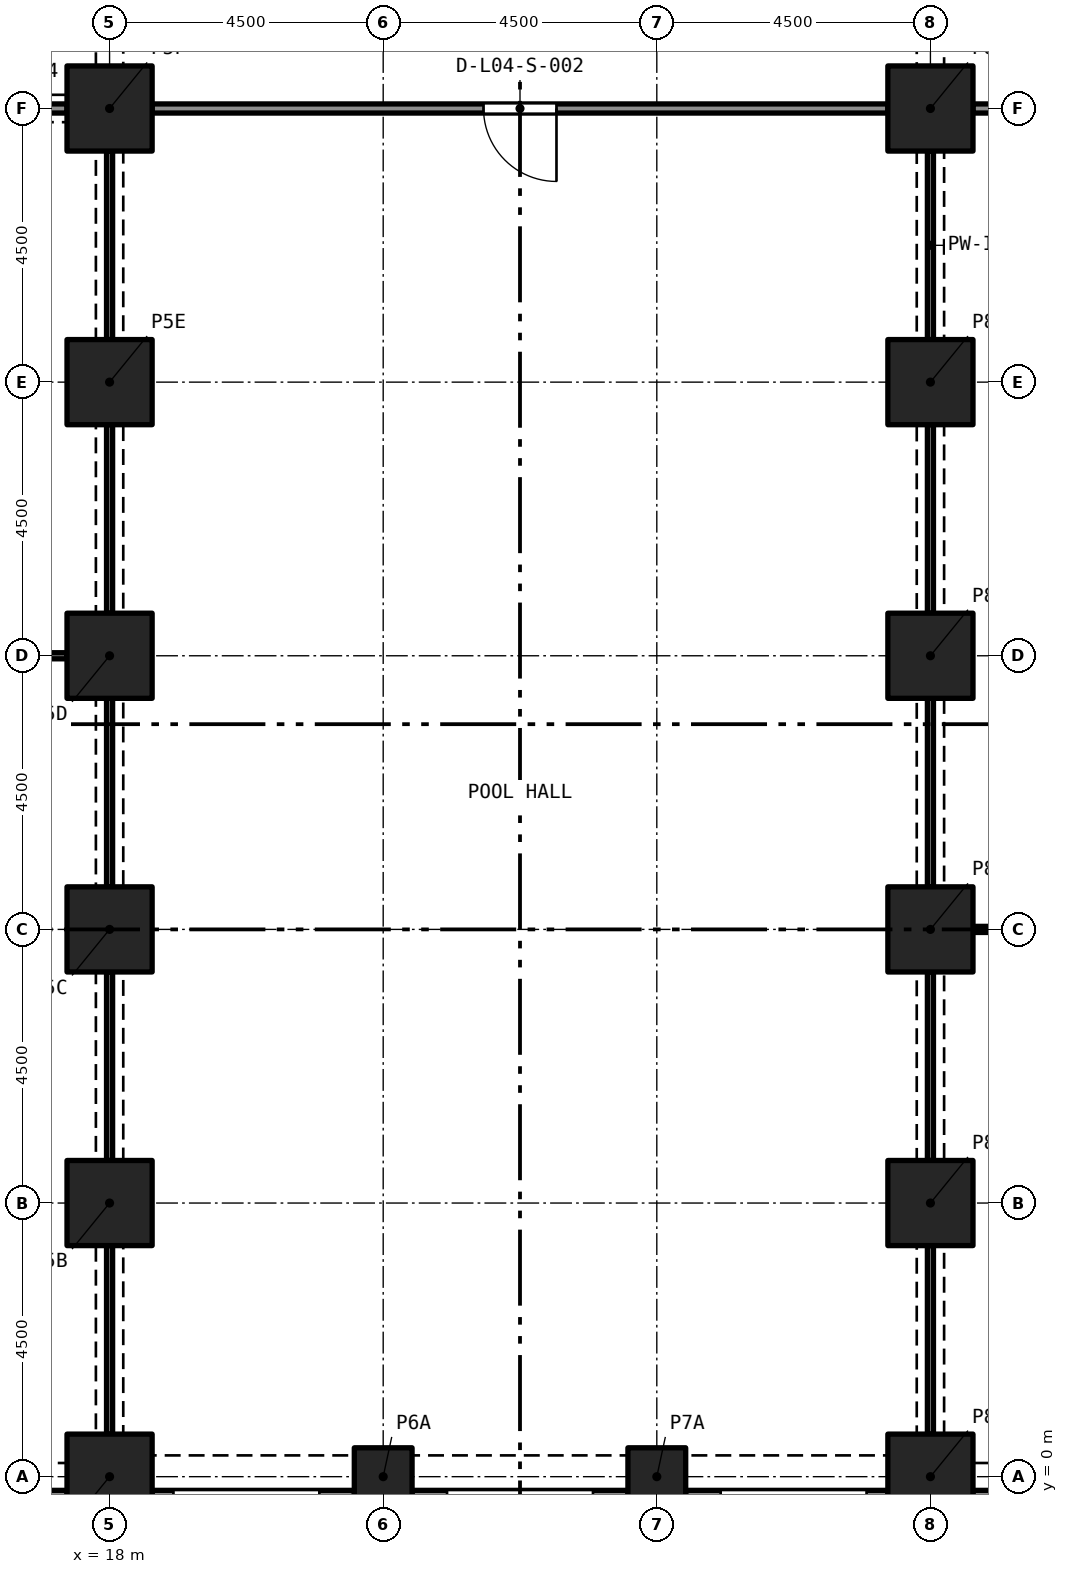
"""IFC4 building model, lengths in metres.
Left out: names, types, materials, properties, quantities, classifications, styles, units other than length and angle.
Written with IfcOpenShell. Run it as: python <this file> out.ifc"""

import sys

from ifc_helpers import new_model, si_unit, direction, frame, frame_2d, origin, origin_2d, place, context, subcontext, project, spatial, rectangle, extrude, element, fill, save


model = new_model("IFC4")
c1 = context("Model", 3, precision=1e-05, world=origin(), true_north=direction((0.0, 1.0)))
c2 = subcontext(c1, "Body", "Model", "MODEL_VIEW")
j1 = project(units=[si_unit("LENGTHUNIT", "METRE"), si_unit("PLANEANGLEUNIT", "RADIAN")], contexts=[c1])
p1 = place(None, origin())
s1 = spatial("IfcSite", under=j1, at=p1, CompositionType="ELEMENT")
p2 = place(p1, origin())
s2 = spatial("IfcBuilding", under=s1, at=p2, CompositionType="ELEMENT")
p3 = place(p2, frame((0.0, 0.0, 21.0)))
s3 = spatial("IfcBuildingStorey", under=s2, at=p3, CompositionType="ELEMENT", Elevation=21.0)
p4 = place(p3, frame((18.0, 0.0, 0.0), z_axis=(0.0, 0.0, 1.0), x_axis=(1.0, 0.0, 0.0)))
e1 = element("IfcColumn", 1, at=p4, inside=s3, PredefinedType="COLUMN", context=c2, shape_type="SweptSolid", body=[
    extrude(rectangle(XDim=1.4, YDim=1.4, at=origin_2d()), origin(), (0.0, 0.0, 1.0), 5.0),
])
for number, where, z_axis, x_axis in (
    (2, (22.5, 0.0, 0.0), (0.0, 0.0, 1.0), (1.0, 0.0, 0.0)),
    (3, (27.0, 0.0, 0.0), (0.0, 0.0, 1.0), (1.0, 0.0, 0.0)),
):
    element("IfcColumn", number, at=place(p3, frame(where, z_axis=z_axis, x_axis=x_axis)), inside=s3, PredefinedType="COLUMN", context=c2, shape_type="SweptSolid", body=[
        extrude(rectangle(XDim=0.95, YDim=0.95, at=origin_2d()), origin(), (0.0, 0.0, 1.0), 5.0),
    ])
for number, where, z_axis, x_axis in (
    (4, (31.5, 0.0, 0.0), (0.0, 0.0, 1.0), (1.0, 0.0, 0.0)),
    (5, (18.0, 4.5, 0.0), (0.0, 0.0, 1.0), (1.0, 0.0, 0.0)),
    (6, (31.5, 4.5, 0.0), (0.0, 0.0, 1.0), (1.0, 0.0, 0.0)),
    (7, (18.0, 9.0, 0.0), (0.0, 0.0, 1.0), (1.0, 0.0, 0.0)),
    (8, (31.5, 9.0, 0.0), (0.0, 0.0, 1.0), (1.0, 0.0, 0.0)),
    (9, (18.0, 13.5, 0.0), (0.0, 0.0, 1.0), (1.0, 0.0, 0.0)),
    (10, (31.5, 13.5, 0.0), (0.0, 0.0, 1.0), (1.0, 0.0, 0.0)),
    (11, (18.0, 18.0, 0.0), (0.0, 0.0, 1.0), (1.0, 0.0, 0.0)),
    (12, (31.5, 18.0, 0.0), (0.0, 0.0, 1.0), (1.0, 0.0, 0.0)),
    (13, (18.0, 22.5, 0.0), (0.0, 0.0, 1.0), (1.0, 0.0, 0.0)),
    (14, (31.5, 22.5, 0.0), (0.0, 0.0, 1.0), (1.0, 0.0, 0.0)),
):
    element("IfcColumn", number, at=place(p3, frame(where, z_axis=z_axis, x_axis=x_axis)), inside=s3, PredefinedType="COLUMN", context=c2, shape_type="SweptSolid", body=[
        extrude(rectangle(XDim=1.4, YDim=1.4, at=origin_2d()), origin(), (0.0, 0.0, 1.0), 5.0),
    ])
p5 = place(p3, frame((17.3, -0.375, 0.0), z_axis=(0.0, 0.0, 1.0), x_axis=(-1.0, 0.0, 0.0)))
e15 = element("IfcWall", 15, at=p5, inside=s3, PredefinedType="SOLIDWALL", context=c2, shape_type="SweptSolid", body=[
    extrude(rectangle(XDim=3.1, YDim=0.3, at=frame_2d((1.55, 0.0))), origin(), (0.0, 0.0, 1.0), 5.0),
])
p6 = place(p5, frame((0.4, 0.0, 0.45)))
e16 = element("IfcOpeningElement", 16, at=p6, cuts=e15, PredefinedType="OPENING", context=c2, shape_type="SweptSolid", body=[
    extrude(rectangle(XDim=2.3, YDim=3.3, at=frame_2d((1.15, 1.65))), frame((0.0, 0.16, 0.0), z_axis=(0.0, -1.0, 0.0), x_axis=(1.0, 0.0, 0.0)), (0.0, 0.0, 1.0), 0.32),
])
p7 = place(p3, frame((22.025, -0.375, 0.0), z_axis=(0.0, 0.0, 1.0), x_axis=(-1.0, 0.0, 0.0)))
e17 = element("IfcWall", 17, at=p7, inside=s3, PredefinedType="SOLIDWALL", context=c2, shape_type="SweptSolid", body=[
    extrude(rectangle(XDim=3.325, YDim=0.3, at=frame_2d((1.663, 0.0))), origin(), (0.0, 0.0, 1.0), 5.0),
])
p8 = place(p7, frame((0.575, 0.0, 0.45)))
e18 = element("IfcOpeningElement", 18, at=p8, cuts=e17, PredefinedType="OPENING", context=c2, shape_type="SweptSolid", body=[
    extrude(rectangle(XDim=2.4, YDim=3.3, at=frame_2d((1.2, 1.65))), frame((0.0, 0.16, 0.0), z_axis=(0.0, -1.0, 0.0), x_axis=(1.0, 0.0, 0.0)), (0.0, 0.0, 1.0), 0.32),
])
p9 = place(p3, frame((26.525, -0.375, 0.0), z_axis=(0.0, 0.0, 1.0), x_axis=(-1.0, 0.0, 0.0)))
e19 = element("IfcWall", 19, at=p9, inside=s3, PredefinedType="SOLIDWALL", context=c2, shape_type="SweptSolid", body=[
    extrude(rectangle(XDim=3.55, YDim=0.3, at=frame_2d((1.775, 0.0))), origin(), (0.0, 0.0, 1.0), 5.0),
])
p10 = place(p9, frame((0.575, 0.0, 0.45)))
e20 = element("IfcOpeningElement", 20, at=p10, cuts=e19, PredefinedType="OPENING", context=c2, shape_type="SweptSolid", body=[
    extrude(rectangle(XDim=2.4, YDim=3.3, at=frame_2d((1.2, 1.65))), frame((0.0, 0.16, 0.0), z_axis=(0.0, -1.0, 0.0), x_axis=(1.0, 0.0, 0.0)), (0.0, 0.0, 1.0), 0.32),
])
p11 = place(p3, frame((30.8, -0.375, 0.0), z_axis=(0.0, 0.0, 1.0), x_axis=(-1.0, 0.0, 0.0)))
e21 = element("IfcWall", 21, at=p11, inside=s3, PredefinedType="SOLIDWALL", context=c2, shape_type="SweptSolid", body=[
    extrude(rectangle(XDim=3.325, YDim=0.3, at=frame_2d((1.663, 0.0))), origin(), (0.0, 0.0, 1.0), 5.0),
])
p12 = place(p11, frame((0.35, 0.0, 0.45)))
e22 = element("IfcOpeningElement", 22, at=p12, cuts=e21, PredefinedType="OPENING", context=c2, shape_type="SweptSolid", body=[
    extrude(rectangle(XDim=2.4, YDim=3.3, at=frame_2d((1.2, 1.65))), frame((0.0, 0.16, 0.0), z_axis=(0.0, -1.0, 0.0), x_axis=(1.0, 0.0, 0.0)), (0.0, 0.0, 1.0), 0.32),
])
p13 = place(p3, frame((35.3, -0.375, 0.0), z_axis=(0.0, 0.0, 1.0), x_axis=(-1.0, 0.0, 0.0)))
e23 = element("IfcWall", 23, at=p13, inside=s3, PredefinedType="SOLIDWALL", context=c2, shape_type="SweptSolid", body=[
    extrude(rectangle(XDim=3.1, YDim=0.3, at=frame_2d((1.55, 0.0))), origin(), (0.0, 0.0, 1.0), 5.0),
])
p14 = place(p13, frame((0.4, 0.0, 0.45)))
e24 = element("IfcOpeningElement", 24, at=p14, cuts=e23, PredefinedType="OPENING", context=c2, shape_type="SweptSolid", body=[
    extrude(rectangle(XDim=2.3, YDim=3.3, at=frame_2d((1.15, 1.65))), frame((0.0, 0.16, 0.0), z_axis=(0.0, -1.0, 0.0), x_axis=(1.0, 0.0, 0.0)), (0.0, 0.0, 1.0), 0.32),
])
p15 = place(p3, frame((30.8, 22.5, 0.0), z_axis=(0.0, 0.0, 1.0), x_axis=(-1.0, 0.0, 0.0)))
e25 = element("IfcWall", 25, at=p15, inside=s3, PredefinedType="PARTITIONING", context=c2, shape_type="SweptSolid", body=[
    extrude(rectangle(XDim=12.1, YDim=0.15, at=frame_2d((6.05, 0.0))), origin(), (0.0, 0.0, 1.0), 4.55),
])
p16 = place(p15, frame((5.45, 0.0, 0.0)))
e26 = element("IfcOpeningElement", 26, at=p16, cuts=e25, PredefinedType="OPENING", context=c2, shape_type="SweptSolid", body=[
    extrude(rectangle(XDim=1.2, YDim=2.1, at=frame_2d((0.6, 1.05))), frame((0.0, 0.085, 0.0), z_axis=(0.0, -1.0, 0.0), x_axis=(1.0, 0.0, 0.0)), (0.0, 0.0, 1.0), 0.17),
])
for number, where, z_axis, x_axis in (
    (27, (31.5, 5.2, 0.0), (0.0, 0.0, 1.0), (0.0, 1.0, 0.0)),
    (28, (31.5, 0.7, 0.0), (0.0, 0.0, 1.0), (0.0, 1.0, 0.0)),
    (29, (31.5, 18.7, 0.0), (0.0, 0.0, 1.0), (0.0, 1.0, 0.0)),
    (30, (31.5, 14.2, 0.0), (0.0, 0.0, 1.0), (0.0, 1.0, 0.0)),
    (31, (31.5, 9.7, 0.0), (0.0, 0.0, 1.0), (0.0, 1.0, 0.0)),
    (32, (18.0, 0.7, 0.0), (0.0, 0.0, 1.0), (0.0, 1.0, 0.0)),
    (33, (18.0, 5.2, 0.0), (0.0, 0.0, 1.0), (0.0, 1.0, 0.0)),
    (34, (18.0, 9.7, 0.0), (0.0, 0.0, 1.0), (0.0, 1.0, 0.0)),
    (35, (18.0, 14.2, 0.0), (0.0, 0.0, 1.0), (0.0, 1.0, 0.0)),
    (36, (18.0, 18.7, 0.0), (0.0, 0.0, 1.0), (0.0, 1.0, 0.0)),
):
    element("IfcWall", number, at=place(p3, frame(where, z_axis=z_axis, x_axis=x_axis)), inside=s3, PredefinedType="PARTITIONING", context=c2, shape_type="SweptSolid", body=[
        extrude(rectangle(XDim=3.1, YDim=0.1, at=frame_2d((1.55, 0.0))), origin(), (0.0, 0.0, 1.0), 4.18),
    ])
p17 = place(p3, frame((40.575, 22.5, 0.0), z_axis=(0.0, 0.0, 1.0), x_axis=(-1.0, 0.0, 0.0)))
e37 = element("IfcWall", 37, at=p17, inside=s3, PredefinedType="PARTITIONING", context=c2, shape_type="SweptSolid", body=[
    extrude(rectangle(XDim=8.375, YDim=0.15, at=frame_2d((4.188, 0.0))), origin(), (0.0, 0.0, 1.0), 4.65),
])
p18 = place(p17, frame((3.725, 0.0, 0.0)))
e38 = element("IfcOpeningElement", 38, at=p18, cuts=e37, PredefinedType="OPENING", context=c2, shape_type="SweptSolid", body=[
    extrude(rectangle(XDim=1.0, YDim=2.1, at=frame_2d((0.5, 1.05))), frame((0.0, 0.085, 0.0), z_axis=(0.0, -1.0, 0.0), x_axis=(1.0, 0.0, 0.0)), (0.0, 0.0, 1.0), 0.17),
])
p19 = place(p3, frame((32.2, 9.0, 0.0), z_axis=(0.0, 0.0, 1.0), x_axis=(1.0, 0.0, 0.0)))
e39 = element("IfcWall", 39, at=p19, inside=s3, PredefinedType="PARTITIONING", context=c2, shape_type="SweptSolid", body=[
    extrude(rectangle(XDim=8.225, YDim=0.1, at=frame_2d((4.113, 0.0))), origin(), (0.0, 0.0, 1.0), 4.65),
])
p20 = place(p3, frame((17.3, 22.5, 0.0), z_axis=(0.0, 0.0, 1.0), x_axis=(-1.0, 0.0, 0.0)))
e40 = element("IfcWall", 40, at=p20, inside=s3, PredefinedType="PARTITIONING", context=c2, shape_type="SweptSolid", body=[
    extrude(rectangle(XDim=3.1, YDim=0.15, at=frame_2d((1.55, 0.0))), origin(), (0.0, 0.0, 1.0), 4.18),
])
p21 = place(p20, frame((1.05, 0.0, 0.0)))
e41 = element("IfcOpeningElement", 41, at=p21, cuts=e40, PredefinedType="OPENING", context=c2, shape_type="SweptSolid", body=[
    extrude(rectangle(XDim=1.0, YDim=2.1, at=frame_2d((0.5, 1.05))), frame((0.0, 0.085, 0.0), z_axis=(0.0, -1.0, 0.0), x_axis=(1.0, 0.0, 0.0)), (0.0, 0.0, 1.0), 0.17),
])
p22 = place(p3, frame((9.075, 13.5, 0.0), z_axis=(0.0, 0.0, 1.0), x_axis=(1.0, 0.0, 0.0)))
e42 = element("IfcWall", 42, at=p22, inside=s3, PredefinedType="PARTITIONING", context=c2, shape_type="SweptSolid", body=[
    extrude(rectangle(XDim=8.225, YDim=0.1, at=frame_2d((4.113, 0.0))), origin(), (0.0, 0.0, 1.0), 4.65),
])
p23 = place(p16, origin())
e43 = element("IfcDoor", 43, at=p23, inside=s3, OperationType="SINGLE_SWING_RIGHT", PredefinedType="DOOR", context=c2, shape_type="SweptSolid", body=[
    extrude(rectangle(XDim=1.2, YDim=2.1, at=frame_2d((0.6, 1.05))), frame((0.0, 0.025, 0.0), z_axis=(0.0, -1.0, 0.0), x_axis=(1.0, 0.0, 0.0)), (0.0, 0.0, 1.0), 0.05),
])
fill(e26, e43)
save(model, sys.argv[1])
